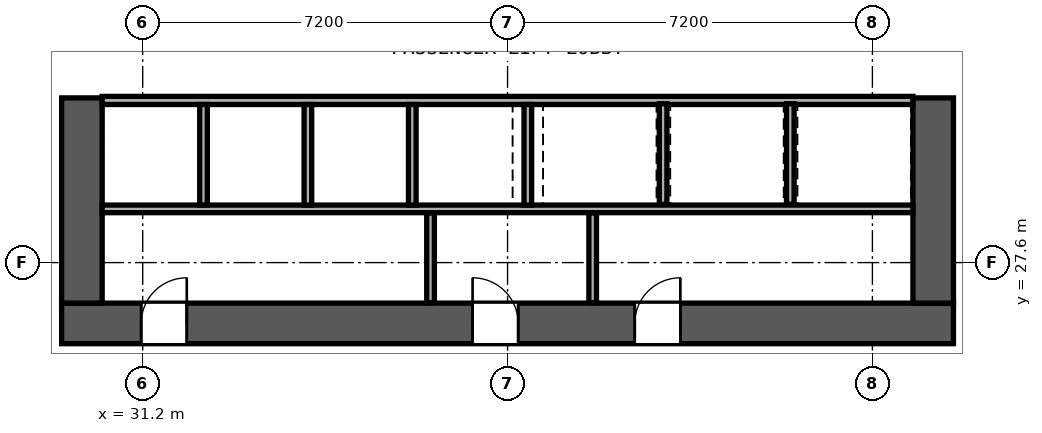
"""IFC4 building model, lengths in metres.
Left out: names, types, materials, properties, quantities, classifications, styles, units other than length and angle.
Written with IfcOpenShell. Run it as: python <this file> out.ifc"""

import sys

from ifc_helpers import new_model, si_unit, direction, frame, frame_2d, origin, place, context, subcontext, project, spatial, rectangle, extrude, element, fill, save


model = new_model("IFC4")
c1 = context("Model", 3, precision=1e-05, world=origin(), true_north=direction((0.0, 1.0)))
c2 = subcontext(c1, "Body", "Model", "MODEL_VIEW")
j1 = project(units=[si_unit("LENGTHUNIT", "METRE"), si_unit("PLANEANGLEUNIT", "RADIAN")], contexts=[c1])
p1 = place(None, origin())
s1 = spatial("IfcSite", under=j1, at=p1, CompositionType="ELEMENT")
p2 = place(p1, origin())
s2 = spatial("IfcBuilding", under=s1, at=p2, CompositionType="ELEMENT")
p3 = place(p2, frame((0.0, 0.0, 5.4)))
s3 = spatial("IfcBuildingStorey", under=s2, at=p3, CompositionType="ELEMENT", Elevation=5.4)
p4 = place(p3, frame((29.6, 26.4, 0.0), z_axis=(0.0, 0.0, 1.0), x_axis=(1.0, 0.0, 0.0)))
e1 = element("IfcWall", 1, at=p4, inside=s3, PredefinedType="SHEAR", context=c2, shape_type="SweptSolid", body=[
    extrude(rectangle(XDim=17.6, YDim=0.8, at=frame_2d((8.8, 0.0))), origin(), (0.0, 0.0, 1.0), 4.56),
])
p5 = place(p4, frame((2.47, 0.0, 0.0), z_axis=(0.0, 0.0, 1.0), x_axis=(-1.0, 0.0, 0.0)))
e2 = element("IfcOpeningElement", 2, at=p5, cuts=e1, PredefinedType="OPENING", context=c2, shape_type="SweptSolid", body=[
    extrude(rectangle(XDim=0.9, YDim=2.1, at=frame_2d((0.45, 1.05))), frame((0.0, 0.41, 0.0), z_axis=(0.0, -1.0, 0.0), x_axis=(1.0, 0.0, 0.0)), (0.0, 0.0, 1.0), 0.82),
])
p6 = place(p4, frame((9.01, 0.0, 0.0), z_axis=(0.0, 0.0, 1.0), x_axis=(-1.0, 0.0, 0.0)))
e3 = element("IfcOpeningElement", 3, at=p6, cuts=e1, PredefinedType="OPENING", context=c2, shape_type="SweptSolid", body=[
    extrude(rectangle(XDim=0.9, YDim=2.1, at=frame_2d((0.45, 1.05))), frame((0.0, 0.41, 0.0), z_axis=(0.0, -1.0, 0.0), x_axis=(1.0, 0.0, 0.0)), (0.0, 0.0, 1.0), 0.82),
])
p7 = place(p4, frame((12.21, 0.0, 0.0), z_axis=(0.0, 0.0, 1.0), x_axis=(-1.0, 0.0, 0.0)))
e4 = element("IfcOpeningElement", 4, at=p7, cuts=e1, PredefinedType="OPENING", context=c2, shape_type="SweptSolid", body=[
    extrude(rectangle(XDim=0.9, YDim=2.1, at=frame_2d((0.45, 1.05))), frame((0.0, 0.41, 0.0), z_axis=(0.0, -1.0, 0.0), x_axis=(1.0, 0.0, 0.0)), (0.0, 0.0, 1.0), 0.82),
])
for number, where, z_axis, x_axis in (
    (5, (30.0, 26.8, 0.0), (0.0, 0.0, 1.0), (0.0, 1.0, 0.0)),
    (6, (46.8, 26.8, 0.0), (0.0, 0.0, 1.0), (0.0, 1.0, 0.0)),
):
    element("IfcWall", number, at=place(p3, frame(where, z_axis=z_axis, x_axis=x_axis)), inside=s3, PredefinedType="SHEAR", context=c2, shape_type="SweptSolid", body=[
        extrude(rectangle(XDim=4.05, YDim=0.8, at=frame_2d((2.025, 0.0))), origin(), (0.0, 0.0, 1.0), 4.56),
    ])
p8 = place(p3, frame((30.4, 30.8, 0.0), z_axis=(0.0, 0.0, 1.0), x_axis=(1.0, 0.0, 0.0)))
e7 = element("IfcWall", 7, at=p8, inside=s3, PredefinedType="SOLIDWALL", context=c2, shape_type="SweptSolid", body=[
    extrude(rectangle(XDim=16.0, YDim=0.16, at=frame_2d((8.0, 0.0))), origin(), (0.0, 0.0, 1.0), 4.56),
])
p9 = place(p3, frame((30.4, 28.66, 0.0), z_axis=(0.0, 0.0, 1.0), x_axis=(1.0, 0.0, 0.0)))
e8 = element("IfcWall", 8, at=p9, inside=s3, PredefinedType="PARTITIONING", context=c2, shape_type="SweptSolid", body=[
    extrude(rectangle(XDim=16.0, YDim=0.15, at=frame_2d((8.0, 0.0))), origin(), (0.0, 0.0, 1.0), 4.56),
])
for number, where, z_axis, x_axis in (
    (9, (32.4, 28.735, 0.0), (0.0, 0.0, 1.0), (0.0, 1.0, 0.0)),
    (10, (34.46, 28.735, 0.0), (0.0, 0.0, 1.0), (0.0, 1.0, 0.0)),
    (11, (36.52, 28.735, 0.0), (0.0, 0.0, 1.0), (0.0, 1.0, 0.0)),
    (12, (38.8, 28.735, 0.0), (0.0, 0.0, 1.0), (0.0, 1.0, 0.0)),
):
    element("IfcWall", number, at=place(p3, frame(where, z_axis=z_axis, x_axis=x_axis)), inside=s3, PredefinedType="SOLIDWALL", context=c2, shape_type="SweptSolid", body=[
        extrude(rectangle(XDim=1.985, YDim=0.15, at=frame_2d((0.992, 0.0))), origin(), (0.0, 0.0, 1.0), 4.56),
    ])
for number, where, z_axis, x_axis in (
    (13, (36.88, 26.81, 0.0), (0.0, 0.0, 1.0), (0.0, 1.0, 0.0)),
    (14, (40.08, 26.81, 0.0), (0.0, 0.0, 1.0), (0.0, 1.0, 0.0)),
):
    element("IfcWall", number, at=place(p3, frame(where, z_axis=z_axis, x_axis=x_axis)), inside=s3, PredefinedType="PARTITIONING", context=c2, shape_type="SweptSolid", body=[
        extrude(rectangle(XDim=1.77, YDim=0.15, at=frame_2d((0.885, 0.0))), origin(), (0.0, 0.0, 1.0), 4.56),
    ])
for number, where, z_axis, x_axis in (
    (15, (41.47, 28.75, 0.0), (0.0, 0.0, 1.0), (0.0, 1.0, 0.0)),
    (16, (43.98, 28.75, 0.0), (0.0, 0.0, 1.0), (0.0, 1.0, 0.0)),
):
    element("IfcWall", number, at=place(p3, frame(where, z_axis=z_axis, x_axis=x_axis)), inside=s3, PredefinedType="SOLIDWALL", context=c2, shape_type="SweptSolid", body=[
        extrude(rectangle(XDim=1.985, YDim=0.15, at=frame_2d((0.993, 0.0))), origin(), (0.0, 0.0, 1.0), 4.56),
    ])
p10 = place(p5, origin())
e17 = element("IfcDoor", 17, at=p10, inside=s3, OperationType="SINGLE_SWING_LEFT", PredefinedType="DOOR", context=c2, shape_type="SweptSolid", body=[
    extrude(rectangle(XDim=0.9, YDim=2.1, at=frame_2d((0.45, 1.05))), frame((0.0, -0.195, 0.0), z_axis=(0.0, -1.0, 0.0), x_axis=(1.0, 0.0, 0.0)), (0.0, 0.0, 1.0), 0.05),
])
fill(e2, e17)
p11 = place(p6, origin())
e18 = element("IfcDoor", 18, at=p11, inside=s3, OperationType="SINGLE_SWING_RIGHT", PredefinedType="DOOR", context=c2, shape_type="SweptSolid", body=[
    extrude(rectangle(XDim=0.9, YDim=2.1, at=frame_2d((0.45, 1.05))), frame((0.0, -0.195, 0.0), z_axis=(0.0, -1.0, 0.0), x_axis=(1.0, 0.0, 0.0)), (0.0, 0.0, 1.0), 0.05),
])
fill(e3, e18)
p12 = place(p7, origin())
e19 = element("IfcDoor", 19, at=p12, inside=s3, OperationType="SINGLE_SWING_LEFT", PredefinedType="DOOR", context=c2, shape_type="SweptSolid", body=[
    extrude(rectangle(XDim=0.9, YDim=2.1, at=frame_2d((0.45, 1.05))), frame((0.0, -0.195, 0.0), z_axis=(0.0, -1.0, 0.0), x_axis=(1.0, 0.0, 0.0)), (0.0, 0.0, 1.0), 0.05),
])
fill(e4, e19)
save(model, sys.argv[1])
